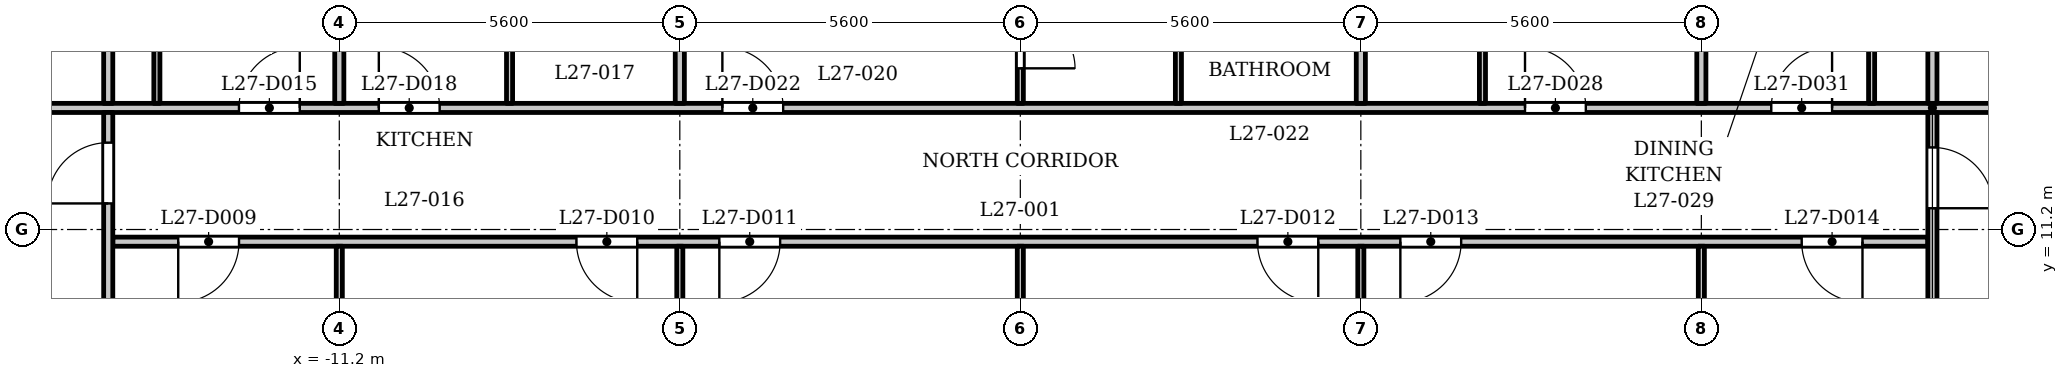
"""IFC4 building model, lengths in metres.
Left out: names, types, materials, properties, quantities, classifications, styles, units other than length and angle.
Written with IfcOpenShell. Run it as: python <this file> out.ifc"""

import sys

from ifc_helpers import new_model, si_unit, direction, frame, frame_2d, origin, place, context, subcontext, project, spatial, rectangle, extrude, element, fill, save


model = new_model("IFC4")
c1 = context("Model", 3, precision=1e-05, world=origin(), true_north=direction((0.0, 1.0)))
c2 = subcontext(c1, "Body", "Model", "MODEL_VIEW")
j1 = project(units=[si_unit("LENGTHUNIT", "METRE"), si_unit("PLANEANGLEUNIT", "RADIAN")], contexts=[c1])
p1 = place(None, origin())
s1 = spatial("IfcSite", under=j1, at=p1, CompositionType="ELEMENT")
p2 = place(p1, origin())
s2 = spatial("IfcBuilding", under=s1, at=p2, CompositionType="ELEMENT")
p3 = place(p2, frame((0.0, 0.0, 107.8)))
s3 = spatial("IfcBuildingStorey", under=s2, at=p3, CompositionType="ELEMENT", Elevation=107.8)
p4 = place(p3, frame((-14.925, 11.0, 0.0), z_axis=(0.0, 0.0, 1.0), x_axis=(1.0, 0.0, 0.0)))
e1 = element("IfcWall", 1, at=p4, inside=s3, PredefinedType="PARTITIONING", context=c2, shape_type="SweptSolid", body=[
    extrude(rectangle(XDim=29.85, YDim=0.15, at=frame_2d((14.925, 0.0))), origin(), (0.0, 0.0, 1.0), 3.2),
])
p5 = place(p4, frame((1.076, 0.0, 0.0)))
e2 = element("IfcOpeningElement", 2, at=p5, cuts=e1, PredefinedType="OPENING", context=c2, shape_type="SweptSolid", body=[
    extrude(rectangle(XDim=1.0, YDim=2.1, at=frame_2d((0.5, 1.05))), frame((0.0, 0.085, 0.0), z_axis=(0.0, -1.0, 0.0), x_axis=(1.0, 0.0, 0.0)), (0.0, 0.0, 1.0), 0.17),
])
p6 = place(p4, frame((7.625, 0.0, 0.0)))
e3 = element("IfcOpeningElement", 3, at=p6, cuts=e1, PredefinedType="OPENING", context=c2, shape_type="SweptSolid", body=[
    extrude(rectangle(XDim=1.0, YDim=2.1, at=frame_2d((0.5, 1.05))), frame((0.0, 0.085, 0.0), z_axis=(0.0, -1.0, 0.0), x_axis=(1.0, 0.0, 0.0)), (0.0, 0.0, 1.0), 0.17),
])
p7 = place(p4, frame((9.975, 0.0, 0.0)))
e4 = element("IfcOpeningElement", 4, at=p7, cuts=e1, PredefinedType="OPENING", context=c2, shape_type="SweptSolid", body=[
    extrude(rectangle(XDim=1.0, YDim=2.1, at=frame_2d((0.5, 1.05))), frame((0.0, 0.085, 0.0), z_axis=(0.0, -1.0, 0.0), x_axis=(1.0, 0.0, 0.0)), (0.0, 0.0, 1.0), 0.17),
])
p8 = place(p4, frame((18.825, 0.0, 0.0)))
e5 = element("IfcOpeningElement", 5, at=p8, cuts=e1, PredefinedType="OPENING", context=c2, shape_type="SweptSolid", body=[
    extrude(rectangle(XDim=1.0, YDim=2.1, at=frame_2d((0.5, 1.05))), frame((0.0, 0.085, 0.0), z_axis=(0.0, -1.0, 0.0), x_axis=(1.0, 0.0, 0.0)), (0.0, 0.0, 1.0), 0.17),
])
p9 = place(p4, frame((21.175, 0.0, 0.0)))
e6 = element("IfcOpeningElement", 6, at=p9, cuts=e1, PredefinedType="OPENING", context=c2, shape_type="SweptSolid", body=[
    extrude(rectangle(XDim=1.0, YDim=2.1, at=frame_2d((0.5, 1.05))), frame((0.0, 0.085, 0.0), z_axis=(0.0, -1.0, 0.0), x_axis=(1.0, 0.0, 0.0)), (0.0, 0.0, 1.0), 0.17),
])
p10 = place(p4, frame((27.775, 0.0, 0.0)))
e7 = element("IfcOpeningElement", 7, at=p10, cuts=e1, PredefinedType="OPENING", context=c2, shape_type="SweptSolid", body=[
    extrude(rectangle(XDim=1.0, YDim=2.1, at=frame_2d((0.5, 1.05))), frame((0.0, 0.085, 0.0), z_axis=(0.0, -1.0, 0.0), x_axis=(1.0, 0.0, 0.0)), (0.0, 0.0, 1.0), 0.17),
])
p11 = place(p3, frame((-17.4, 13.2, 0.0), z_axis=(0.0, 0.0, 1.0), x_axis=(1.0, 0.0, 0.0)))
e8 = element("IfcWall", 8, at=p11, inside=s3, PredefinedType="PARTITIONING", context=c2, shape_type="SweptSolid", body=[
    extrude(rectangle(XDim=34.8, YDim=0.15, at=frame_2d((17.4, 0.0))), origin(), (0.0, 0.0, 1.0), 3.2),
])
p12 = place(p11, frame((0.25, 0.0, 0.0)))
e9 = element("IfcOpeningElement", 9, at=p12, cuts=e8, PredefinedType="OPENING", context=c2, shape_type="SweptSolid", body=[
    extrude(rectangle(XDim=1.0, YDim=2.1, at=frame_2d((0.5, 1.05))), frame((0.0, 0.085, 0.0), z_axis=(0.0, -1.0, 0.0), x_axis=(1.0, 0.0, 0.0)), (0.0, 0.0, 1.0), 0.17),
])
p13 = place(p11, frame((33.65, 0.0, 0.0)))
e10 = element("IfcOpeningElement", 10, at=p13, cuts=e8, PredefinedType="OPENING", context=c2, shape_type="SweptSolid", body=[
    extrude(rectangle(XDim=1.0, YDim=2.1, at=frame_2d((0.5, 1.05))), frame((0.0, 0.085, 0.0), z_axis=(0.0, -1.0, 0.0), x_axis=(1.0, 0.0, 0.0)), (0.0, 0.0, 1.0), 0.17),
])
p14 = place(p11, frame((4.55, 0.0, 0.0)))
e11 = element("IfcOpeningElement", 11, at=p14, cuts=e8, PredefinedType="OPENING", context=c2, shape_type="SweptSolid", body=[
    extrude(rectangle(XDim=1.0, YDim=2.1, at=frame_2d((0.5, 1.05))), frame((0.0, 0.085, 0.0), z_axis=(0.0, -1.0, 0.0), x_axis=(1.0, 0.0, 0.0)), (0.0, 0.0, 1.0), 0.17),
])
p15 = place(p11, frame((6.85, 0.0, 0.0)))
e12 = element("IfcOpeningElement", 12, at=p15, cuts=e8, PredefinedType="OPENING", context=c2, shape_type="SweptSolid", body=[
    extrude(rectangle(XDim=1.0, YDim=2.1, at=frame_2d((0.5, 1.05))), frame((0.0, 0.085, 0.0), z_axis=(0.0, -1.0, 0.0), x_axis=(1.0, 0.0, 0.0)), (0.0, 0.0, 1.0), 0.17),
])
p16 = place(p11, frame((12.5, 0.0, 0.0)))
e13 = element("IfcOpeningElement", 13, at=p16, cuts=e8, PredefinedType="OPENING", context=c2, shape_type="SweptSolid", body=[
    extrude(rectangle(XDim=1.0, YDim=2.1, at=frame_2d((0.5, 1.05))), frame((0.0, 0.085, 0.0), z_axis=(0.0, -1.0, 0.0), x_axis=(1.0, 0.0, 0.0)), (0.0, 0.0, 1.0), 0.17),
])
p17 = place(p11, frame((25.7, 0.0, 0.0)))
e14 = element("IfcOpeningElement", 14, at=p17, cuts=e8, PredefinedType="OPENING", context=c2, shape_type="SweptSolid", body=[
    extrude(rectangle(XDim=1.0, YDim=2.1, at=frame_2d((0.5, 1.05))), frame((0.0, 0.085, 0.0), z_axis=(0.0, -1.0, 0.0), x_axis=(1.0, 0.0, 0.0)), (0.0, 0.0, 1.0), 0.17),
])
p18 = place(p11, frame((29.75, 0.0, 0.0)))
e15 = element("IfcOpeningElement", 15, at=p18, cuts=e8, PredefinedType="OPENING", context=c2, shape_type="SweptSolid", body=[
    extrude(rectangle(XDim=1.0, YDim=2.1, at=frame_2d((0.5, 1.05))), frame((0.0, 0.085, 0.0), z_axis=(0.0, -1.0, 0.0), x_axis=(1.0, 0.0, 0.0)), (0.0, 0.0, 1.0), 0.17),
])
p19 = place(p3, frame((-15.0, 6.769, 0.0), z_axis=(0.0, 0.0, 1.0), x_axis=(0.0, 1.0, 0.0)))
e16 = element("IfcWall", 16, at=p19, inside=s3, PredefinedType="PARTITIONING", context=c2, shape_type="SweptSolid", body=[
    extrude(rectangle(XDim=6.356, YDim=0.15, at=frame_2d((3.178, 0.0))), origin(), (0.0, 0.0, 1.0), 3.2),
])
p20 = place(p19, frame((4.86, 0.0, 0.0)))
e17 = element("IfcOpeningElement", 17, at=p20, cuts=e16, PredefinedType="OPENING", context=c2, shape_type="SweptSolid", body=[
    extrude(rectangle(XDim=1.0, YDim=2.1, at=frame_2d((0.5, 1.05))), frame((0.0, 0.085, 0.0), z_axis=(0.0, -1.0, 0.0), x_axis=(1.0, 0.0, 0.0)), (0.0, 0.0, 1.0), 0.17),
])
p21 = place(p3, frame((-15.0, 13.275, 0.0), z_axis=(0.0, 0.0, 1.0), x_axis=(0.0, 1.0, 0.0)))
e18 = element("IfcWall", 18, at=p21, inside=s3, PredefinedType="PARTITIONING", context=c2, shape_type="SweptSolid", body=[
    extrude(rectangle(XDim=2.05, YDim=0.15, at=frame_2d((1.025, 0.0))), origin(), (0.0, 0.0, 1.0), 3.2),
])
p22 = place(p3, frame((-14.2, 13.275, 0.0), z_axis=(0.0, 0.0, 1.0), x_axis=(0.0, 1.0, 0.0)))
e19 = element("IfcWall", 19, at=p22, inside=s3, PredefinedType="PARTITIONING", context=c2, shape_type="SweptSolid", body=[
    extrude(rectangle(XDim=3.175, YDim=0.1, at=frame_2d((1.587, 0.0))), origin(), (0.0, 0.0, 1.0), 3.2),
])
p23 = place(p3, frame((-11.2, 7.32, 0.0), z_axis=(0.0, 0.0, 1.0), x_axis=(0.0, 1.0, 0.0)))
e20 = element("IfcWall", 20, at=p23, inside=s3, PredefinedType="PARTITIONING", context=c2, shape_type="SweptSolid", body=[
    extrude(rectangle(XDim=3.605, YDim=0.1, at=frame_2d((1.802, 0.0))), origin(), (0.0, 0.0, 1.0), 3.2),
])
p24 = place(p3, frame((-11.2, 13.275, 0.0), z_axis=(0.0, 0.0, 1.0), x_axis=(0.0, 1.0, 0.0)))
e21 = element("IfcWall", 21, at=p24, inside=s3, PredefinedType="PARTITIONING", context=c2, shape_type="SweptSolid", body=[
    extrude(rectangle(XDim=3.175, YDim=0.15, at=frame_2d((1.587, 0.0))), origin(), (0.0, 0.0, 1.0), 3.2),
])
p25 = place(p3, frame((-8.4, 13.275, 0.0), z_axis=(0.0, 0.0, 1.0), x_axis=(0.0, 1.0, 0.0)))
e22 = element("IfcWall", 22, at=p25, inside=s3, PredefinedType="PARTITIONING", context=c2, shape_type="SweptSolid", body=[
    extrude(rectangle(XDim=3.175, YDim=0.1, at=frame_2d((1.587, 0.0))), origin(), (0.0, 0.0, 1.0), 3.2),
])
p26 = place(p3, frame((-5.6, 7.32, 0.0), z_axis=(0.0, 0.0, 1.0), x_axis=(0.0, 1.0, 0.0)))
e23 = element("IfcWall", 23, at=p26, inside=s3, PredefinedType="PARTITIONING", context=c2, shape_type="SweptSolid", body=[
    extrude(rectangle(XDim=3.605, YDim=0.1, at=frame_2d((1.802, 0.0))), origin(), (0.0, 0.0, 1.0), 3.2),
])
p27 = place(p3, frame((-5.6, 13.275, 0.0), z_axis=(0.0, 0.0, 1.0), x_axis=(0.0, 1.0, 0.0)))
e24 = element("IfcWall", 24, at=p27, inside=s3, PredefinedType="PARTITIONING", context=c2, shape_type="SweptSolid", body=[
    extrude(rectangle(XDim=3.175, YDim=0.15, at=frame_2d((1.587, 0.0))), origin(), (0.0, 0.0, 1.0), 3.2),
])
p28 = place(p3, frame((0.0, 7.32, 0.0), z_axis=(0.0, 0.0, 1.0), x_axis=(0.0, 1.0, 0.0)))
e25 = element("IfcWall", 25, at=p28, inside=s3, PredefinedType="PARTITIONING", context=c2, shape_type="SweptSolid", body=[
    extrude(rectangle(XDim=3.605, YDim=0.1, at=frame_2d((1.802, 0.0))), origin(), (0.0, 0.0, 1.0), 3.2),
])
p29 = place(p3, frame((0.0, 13.275, 0.0), z_axis=(0.0, 0.0, 1.0), x_axis=(0.0, 1.0, 0.0)))
e26 = element("IfcWall", 26, at=p29, inside=s3, PredefinedType="PARTITIONING", context=c2, shape_type="SweptSolid", body=[
    extrude(rectangle(XDim=3.175, YDim=0.1, at=frame_2d((1.587, 0.0))), origin(), (0.0, 0.0, 1.0), 3.2),
])
p30 = place(p29, frame((0.576, 0.0, 0.0)))
e27 = element("IfcOpeningElement", 27, at=p30, cuts=e26, PredefinedType="OPENING", context=c2, shape_type="SweptSolid", body=[
    extrude(rectangle(XDim=0.9, YDim=2.1, at=frame_2d((0.45, 1.05))), frame((0.0, 0.06, 0.0), z_axis=(0.0, -1.0, 0.0), x_axis=(1.0, 0.0, 0.0)), (0.0, 0.0, 1.0), 0.12),
])
p31 = place(p3, frame((2.6, 13.275, 0.0), z_axis=(0.0, 0.0, 1.0), x_axis=(0.0, 1.0, 0.0)))
e28 = element("IfcWall", 28, at=p31, inside=s3, PredefinedType="PARTITIONING", context=c2, shape_type="SweptSolid", body=[
    extrude(rectangle(XDim=3.175, YDim=0.1, at=frame_2d((1.587, 0.0))), origin(), (0.0, 0.0, 1.0), 3.2),
])
p32 = place(p3, frame((5.6, 7.32, 0.0), z_axis=(0.0, 0.0, 1.0), x_axis=(0.0, 1.0, 0.0)))
e29 = element("IfcWall", 29, at=p32, inside=s3, PredefinedType="PARTITIONING", context=c2, shape_type="SweptSolid", body=[
    extrude(rectangle(XDim=3.605, YDim=0.1, at=frame_2d((1.802, 0.0))), origin(), (0.0, 0.0, 1.0), 3.2),
])
p33 = place(p3, frame((5.6, 13.275, 0.0), z_axis=(0.0, 0.0, 1.0), x_axis=(0.0, 1.0, 0.0)))
e30 = element("IfcWall", 30, at=p33, inside=s3, PredefinedType="PARTITIONING", context=c2, shape_type="SweptSolid", body=[
    extrude(rectangle(XDim=3.175, YDim=0.15, at=frame_2d((1.587, 0.0))), origin(), (0.0, 0.0, 1.0), 3.2),
])
p34 = place(p3, frame((7.6, 13.275, 0.0), z_axis=(0.0, 0.0, 1.0), x_axis=(0.0, 1.0, 0.0)))
e31 = element("IfcWall", 31, at=p34, inside=s3, PredefinedType="PARTITIONING", context=c2, shape_type="SweptSolid", body=[
    extrude(rectangle(XDim=3.175, YDim=0.1, at=frame_2d((1.587, 0.0))), origin(), (0.0, 0.0, 1.0), 3.2),
])
p35 = place(p3, frame((11.2, 7.32, 0.0), z_axis=(0.0, 0.0, 1.0), x_axis=(0.0, 1.0, 0.0)))
e32 = element("IfcWall", 32, at=p35, inside=s3, PredefinedType="PARTITIONING", context=c2, shape_type="SweptSolid", body=[
    extrude(rectangle(XDim=3.605, YDim=0.1, at=frame_2d((1.802, 0.0))), origin(), (0.0, 0.0, 1.0), 3.2),
])
p36 = place(p3, frame((11.2, 13.275, 0.0), z_axis=(0.0, 0.0, 1.0), x_axis=(0.0, 1.0, 0.0)))
e33 = element("IfcWall", 33, at=p36, inside=s3, PredefinedType="PARTITIONING", context=c2, shape_type="SweptSolid", body=[
    extrude(rectangle(XDim=3.175, YDim=0.15, at=frame_2d((1.587, 0.0))), origin(), (0.0, 0.0, 1.0), 3.2),
])
p37 = place(p3, frame((14.0, 13.275, 0.0), z_axis=(0.0, 0.0, 1.0), x_axis=(0.0, 1.0, 0.0)))
e34 = element("IfcWall", 34, at=p37, inside=s3, PredefinedType="PARTITIONING", context=c2, shape_type="SweptSolid", body=[
    extrude(rectangle(XDim=3.175, YDim=0.1, at=frame_2d((1.587, 0.0))), origin(), (0.0, 0.0, 1.0), 3.2),
])
p38 = place(p3, frame((15.0, 6.769, 0.0), z_axis=(0.0, 0.0, 1.0), x_axis=(0.0, 1.0, 0.0)))
e35 = element("IfcWall", 35, at=p38, inside=s3, PredefinedType="PARTITIONING", context=c2, shape_type="SweptSolid", body=[
    extrude(rectangle(XDim=6.356, YDim=0.15, at=frame_2d((3.178, 0.0))), origin(), (0.0, 0.0, 1.0), 3.2),
])
p39 = place(p38, frame((4.781, 0.0, 0.0)))
e36 = element("IfcOpeningElement", 36, at=p39, cuts=e35, PredefinedType="OPENING", context=c2, shape_type="SweptSolid", body=[
    extrude(rectangle(XDim=1.0, YDim=2.1, at=frame_2d((0.5, 1.05))), frame((0.0, 0.085, 0.0), z_axis=(0.0, -1.0, 0.0), x_axis=(1.0, 0.0, 0.0)), (0.0, 0.0, 1.0), 0.17),
])
p40 = place(p3, frame((15.0, 13.275, 0.0), z_axis=(0.0, 0.0, 1.0), x_axis=(0.0, 1.0, 0.0)))
e37 = element("IfcWall", 37, at=p40, inside=s3, PredefinedType="PARTITIONING", context=c2, shape_type="SweptSolid", body=[
    extrude(rectangle(XDim=2.05, YDim=0.15, at=frame_2d((1.025, 0.0))), origin(), (0.0, 0.0, 1.0), 3.2),
])
p41 = place(p20, origin())
e38 = element("IfcDoor", 38, at=p41, inside=s3, OperationType="SINGLE_SWING_RIGHT", PredefinedType="DOOR", context=c2, shape_type="SweptSolid", body=[
    extrude(rectangle(XDim=1.0, YDim=2.1, at=frame_2d((0.5, 1.05))), frame((0.0, 0.025, 0.0), z_axis=(0.0, -1.0, 0.0), x_axis=(1.0, 0.0, 0.0)), (0.0, 0.0, 1.0), 0.05),
])
fill(e17, e38)
p42 = place(p39, origin())
e39 = element("IfcDoor", 39, at=p42, inside=s3, OperationType="SINGLE_SWING_LEFT", PredefinedType="DOOR", context=c2, shape_type="SweptSolid", body=[
    extrude(rectangle(XDim=1.0, YDim=2.1, at=frame_2d((0.5, 1.05))), frame((0.0, 0.025, 0.0), z_axis=(0.0, -1.0, 0.0), x_axis=(1.0, 0.0, 0.0)), (0.0, 0.0, 1.0), 0.05),
])
fill(e36, e39)
p43 = place(p5, origin())
e40 = element("IfcDoor", 40, at=p43, inside=s3, OperationType="SINGLE_SWING_LEFT", PredefinedType="DOOR", context=c2, shape_type="SweptSolid", body=[
    extrude(rectangle(XDim=1.0, YDim=2.1, at=frame_2d((0.5, 1.05))), frame((0.0, 0.025, 0.0), z_axis=(0.0, -1.0, 0.0), x_axis=(1.0, 0.0, 0.0)), (0.0, 0.0, 1.0), 0.05),
])
fill(e2, e40)
p44 = place(p6, origin())
e41 = element("IfcDoor", 41, at=p44, inside=s3, OperationType="SINGLE_SWING_RIGHT", PredefinedType="DOOR", context=c2, shape_type="SweptSolid", body=[
    extrude(rectangle(XDim=1.0, YDim=2.1, at=frame_2d((0.5, 1.05))), frame((0.0, 0.025, 0.0), z_axis=(0.0, -1.0, 0.0), x_axis=(1.0, 0.0, 0.0)), (0.0, 0.0, 1.0), 0.05),
])
fill(e3, e41)
p45 = place(p7, origin())
e42 = element("IfcDoor", 42, at=p45, inside=s3, OperationType="SINGLE_SWING_LEFT", PredefinedType="DOOR", context=c2, shape_type="SweptSolid", body=[
    extrude(rectangle(XDim=1.0, YDim=2.1, at=frame_2d((0.5, 1.05))), frame((0.0, 0.025, 0.0), z_axis=(0.0, -1.0, 0.0), x_axis=(1.0, 0.0, 0.0)), (0.0, 0.0, 1.0), 0.05),
])
fill(e4, e42)
p46 = place(p8, origin())
e43 = element("IfcDoor", 43, at=p46, inside=s3, OperationType="SINGLE_SWING_RIGHT", PredefinedType="DOOR", context=c2, shape_type="SweptSolid", body=[
    extrude(rectangle(XDim=1.0, YDim=2.1, at=frame_2d((0.5, 1.05))), frame((0.0, 0.025, 0.0), z_axis=(0.0, -1.0, 0.0), x_axis=(1.0, 0.0, 0.0)), (0.0, 0.0, 1.0), 0.05),
])
fill(e5, e43)
p47 = place(p9, origin())
e44 = element("IfcDoor", 44, at=p47, inside=s3, OperationType="SINGLE_SWING_LEFT", PredefinedType="DOOR", context=c2, shape_type="SweptSolid", body=[
    extrude(rectangle(XDim=1.0, YDim=2.1, at=frame_2d((0.5, 1.05))), frame((0.0, 0.025, 0.0), z_axis=(0.0, -1.0, 0.0), x_axis=(1.0, 0.0, 0.0)), (0.0, 0.0, 1.0), 0.05),
])
fill(e6, e44)
p48 = place(p10, origin())
e45 = element("IfcDoor", 45, at=p48, inside=s3, OperationType="SINGLE_SWING_RIGHT", PredefinedType="DOOR", context=c2, shape_type="SweptSolid", body=[
    extrude(rectangle(XDim=1.0, YDim=2.1, at=frame_2d((0.5, 1.05))), frame((0.0, 0.025, 0.0), z_axis=(0.0, -1.0, 0.0), x_axis=(1.0, 0.0, 0.0)), (0.0, 0.0, 1.0), 0.05),
])
fill(e7, e45)
p49 = place(p14, origin())
e46 = element("IfcDoor", 46, at=p49, inside=s3, OperationType="SINGLE_SWING_LEFT", PredefinedType="DOOR", context=c2, shape_type="SweptSolid", body=[
    extrude(rectangle(XDim=1.0, YDim=2.1, at=frame_2d((0.5, 1.05))), frame((0.0, 0.025, 0.0), z_axis=(0.0, -1.0, 0.0), x_axis=(1.0, 0.0, 0.0)), (0.0, 0.0, 1.0), 0.05),
])
fill(e11, e46)
p50 = place(p15, origin())
e47 = element("IfcDoor", 47, at=p50, inside=s3, OperationType="SINGLE_SWING_RIGHT", PredefinedType="DOOR", context=c2, shape_type="SweptSolid", body=[
    extrude(rectangle(XDim=1.0, YDim=2.1, at=frame_2d((0.5, 1.05))), frame((0.0, 0.025, 0.0), z_axis=(0.0, -1.0, 0.0), x_axis=(1.0, 0.0, 0.0)), (0.0, 0.0, 1.0), 0.05),
])
fill(e12, e47)
p51 = place(p16, origin())
e48 = element("IfcDoor", 48, at=p51, inside=s3, OperationType="SINGLE_SWING_RIGHT", PredefinedType="DOOR", context=c2, shape_type="SweptSolid", body=[
    extrude(rectangle(XDim=1.0, YDim=2.1, at=frame_2d((0.5, 1.05))), frame((0.0, 0.025, 0.0), z_axis=(0.0, -1.0, 0.0), x_axis=(1.0, 0.0, 0.0)), (0.0, 0.0, 1.0), 0.05),
])
fill(e13, e48)
p52 = place(p30, origin())
e49 = element("IfcDoor", 49, at=p52, inside=s3, OperationType="SINGLE_SWING_LEFT", PredefinedType="DOOR", context=c2, shape_type="SweptSolid", body=[
    extrude(rectangle(XDim=0.9, YDim=2.1, at=frame_2d((0.45, 1.05))), frame((0.0, 0.025, 0.0), z_axis=(0.0, -1.0, 0.0), x_axis=(1.0, 0.0, 0.0)), (0.0, 0.0, 1.0), 0.05),
])
fill(e27, e49)
p53 = place(p17, origin())
e50 = element("IfcDoor", 50, at=p53, inside=s3, OperationType="SINGLE_SWING_RIGHT", PredefinedType="DOOR", context=c2, shape_type="SweptSolid", body=[
    extrude(rectangle(XDim=1.0, YDim=2.1, at=frame_2d((0.5, 1.05))), frame((0.0, 0.025, 0.0), z_axis=(0.0, -1.0, 0.0), x_axis=(1.0, 0.0, 0.0)), (0.0, 0.0, 1.0), 0.05),
])
fill(e14, e50)
p54 = place(p18, origin())
e51 = element("IfcDoor", 51, at=p54, inside=s3, OperationType="SINGLE_SWING_LEFT", PredefinedType="DOOR", context=c2, shape_type="SweptSolid", body=[
    extrude(rectangle(XDim=1.0, YDim=2.1, at=frame_2d((0.5, 1.05))), frame((0.0, 0.025, 0.0), z_axis=(0.0, -1.0, 0.0), x_axis=(1.0, 0.0, 0.0)), (0.0, 0.0, 1.0), 0.05),
])
fill(e15, e51)
save(model, sys.argv[1])
